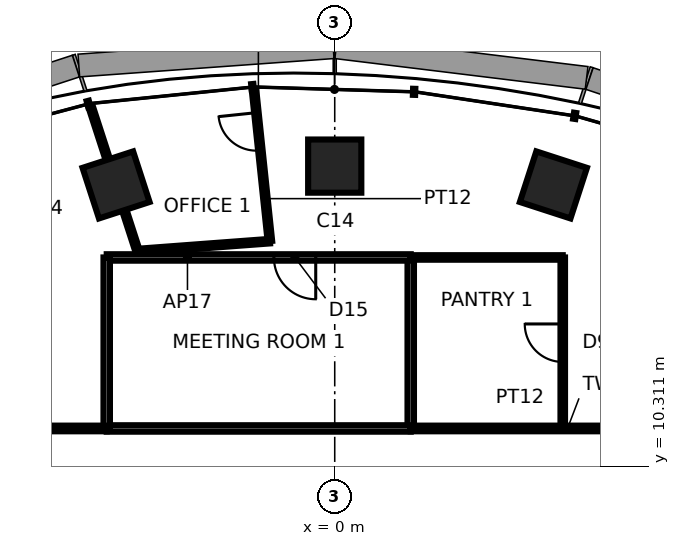
"""IFC4 building model, lengths in metres.
Left out: names, types, materials, properties, quantities, classifications, styles, units other than length and angle.
Written with IfcOpenShell. Run it as: python <this file> out.ifc"""

import sys

from ifc_helpers import new_model, si_unit, direction, frame, frame_2d, origin, origin_2d, place, context, subcontext, project, spatial, rectangle, extrude, element, fill, save


model = new_model("IFC4")
c1 = context("Model", 3, precision=1e-05, world=origin(), true_north=direction((0.0, 1.0)))
c2 = subcontext(c1, "Body", "Model", "MODEL_VIEW")
j1 = project(units=[si_unit("LENGTHUNIT", "METRE"), si_unit("PLANEANGLEUNIT", "RADIAN")], contexts=[c1])
p1 = place(None, origin())
s1 = spatial("IfcSite", under=j1, at=p1, CompositionType="ELEMENT")
p2 = place(p1, origin())
s2 = spatial("IfcBuilding", under=s1, at=p2, CompositionType="ELEMENT")
p3 = place(p2, frame((0.0, 0.0, 226.7)))
s3 = spatial("IfcBuildingStorey", under=s2, at=p3, CompositionType="ELEMENT", Elevation=226.7)
for number, where, z_axis, x_axis in (
    (1, (5.754, 17.708, 0.0), (0.0, 0.0, 1.0), (0.309, 0.951, 0.0)),
    (2, (0.0, 18.204, 0.0), (0.0, 0.0, 1.0), (0.0, 1.0, 0.0)),
    (3, (-5.754, 17.708, 0.0), (0.0, 0.0, 1.0), (-0.309, 0.951, 0.0)),
):
    element("IfcColumn", number, at=place(p3, frame(where, z_axis=z_axis, x_axis=x_axis)), inside=s3, PredefinedType="COLUMN", context=c2, shape_type="SweptSolid", body=[
        extrude(rectangle(XDim=1.4, YDim=1.4, at=origin_2d()), origin(), (0.0, 0.0, 1.0), 3.9),
    ])
p4 = place(p3, frame((16.0, 11.3, 0.0), z_axis=(0.0, 0.0, 1.0), x_axis=(-1.0, 0.0, 0.0)))
e4 = element("IfcWall", 4, at=p4, inside=s3, PredefinedType="PARTITIONING", context=c2, shape_type="SweptSolid", body=[
    extrude(rectangle(XDim=14.0, YDim=0.15, at=frame_2d((7.0, 0.0))), origin(), (0.0, 0.0, 1.0), 3.74),
])
p5 = place(p4, frame((4.4, 0.0, 0.0)))
e5 = element("IfcOpeningElement", 5, at=p5, cuts=e4, PredefinedType="OPENING", context=c2, shape_type="SweptSolid", body=[
    extrude(rectangle(XDim=1.2, YDim=2.4, at=frame_2d((0.6, 1.2))), frame((0.0, 0.085, 0.0), z_axis=(0.0, -1.0, 0.0), x_axis=(1.0, 0.0, 0.0)), (0.0, 0.0, 1.0), 0.17),
])
p6 = place(p3, frame((6.0, 11.3, 0.0), z_axis=(0.0, 0.0, 1.0), x_axis=(0.0, 1.0, 0.0)))
e6 = element("IfcWall", 6, at=p6, inside=s3, PredefinedType="PARTITIONING", context=c2, shape_type="SweptSolid", body=[
    extrude(rectangle(XDim=4.5, YDim=0.12, at=frame_2d((2.25, 0.0))), origin(), (0.0, 0.0, 1.0), 3.74),
])
p7 = place(p6, frame((1.75, 0.0, 0.0)))
e7 = element("IfcOpeningElement", 7, at=p7, cuts=e6, PredefinedType="OPENING", context=c2, shape_type="SweptSolid", body=[
    extrude(rectangle(XDim=1.0, YDim=2.4, at=frame_2d((0.5, 1.2))), frame((0.0, 0.07, 0.0), z_axis=(0.0, -1.0, 0.0), x_axis=(1.0, 0.0, 0.0)), (0.0, 0.0, 1.0), 0.14),
])
p8 = place(p3, frame((6.0, 15.8, 0.0), z_axis=(0.0, 0.0, 1.0), x_axis=(-1.0, 0.0, 0.0)))
e8 = element("IfcWall", 8, at=p8, inside=s3, PredefinedType="PARTITIONING", context=c2, shape_type="SweptSolid", body=[
    extrude(rectangle(XDim=4.0, YDim=0.12, at=frame_2d((2.0, 0.0))), origin(), (0.0, 0.0, 1.0), 3.74),
])
p9 = place(p3, frame((2.0, 15.8, 0.0), z_axis=(0.0, 0.0, 1.0), x_axis=(0.0, -1.0, 0.0)))
e9 = element("IfcWall", 9, at=p9, inside=s3, PredefinedType="PARTITIONING", context=c2, shape_type="SweptSolid", body=[
    extrude(rectangle(XDim=4.5, YDim=0.17, at=frame_2d((2.25, 0.0))), origin(), (0.0, 0.0, 1.0), 3.74),
])
p10 = place(p3, frame((-1.706, 16.229, 0.0), z_axis=(0.0, 0.0, 1.0), x_axis=(-0.104494148666, 0.99452550138, 0.0)))
e10 = element("IfcWall", 10, at=p10, inside=s3, PredefinedType="PARTITIONING", context=c2, shape_type="SweptSolid", body=[
    extrude(rectangle(XDim=4.0, YDim=0.12, at=frame_2d((2.0, 0.0))), origin(), (0.0, 0.0, 1.0), 3.74),
])
p11 = place(p10, frame((2.4, 0.0, 0.0)))
e11 = element("IfcOpeningElement", 11, at=p11, cuts=e10, PredefinedType="OPENING", context=c2, shape_type="SweptSolid", body=[
    extrude(rectangle(XDim=1.0, YDim=2.4, at=frame_2d((0.5, 1.2))), frame((0.0, 0.07, 0.0), z_axis=(0.0, -1.0, 0.0), x_axis=(1.0, 0.0, 0.0)), (0.0, 0.0, 1.0), 0.14),
])
p12 = place(p3, frame((2.0, 15.8, 0.0), z_axis=(0.0, 0.0, 1.0), x_axis=(-1.0, 0.0, 0.0)))
e12 = element("IfcWall", 12, at=p12, inside=s3, PredefinedType="PARTITIONING", context=c2, shape_type="SweptSolid", body=[
    extrude(rectangle(XDim=8.0, YDim=0.17, at=frame_2d((4.0, 0.0))), origin(), (0.0, 0.0, 1.0), 3.74),
])
p13 = place(p12, frame((2.5, 0.0, 0.0)))
e13 = element("IfcOpeningElement", 13, at=p13, cuts=e12, PredefinedType="OPENING", context=c2, shape_type="SweptSolid", body=[
    extrude(rectangle(XDim=1.1, YDim=2.4, at=frame_2d((0.55, 1.2))), frame((0.0, 0.095, 0.0), z_axis=(0.0, -1.0, 0.0), x_axis=(1.0, 0.0, 0.0)), (0.0, 0.0, 1.0), 0.19),
])
p14 = place(p3, frame((-6.0, 11.3, 0.0), z_axis=(0.0, 0.0, 1.0), x_axis=(1.0, 0.0, 0.0)))
e14 = element("IfcWall", 14, at=p14, inside=s3, PredefinedType="PARTITIONING", context=c2, shape_type="SweptSolid", body=[
    extrude(rectangle(XDim=8.0, YDim=0.17, at=frame_2d((4.0, 0.0))), origin(), (0.0, 0.0, 1.0), 3.74),
])
p15 = place(p3, frame((-5.188, 15.969, 0.0), z_axis=(0.0, 0.0, 1.0), x_axis=(0.997219476507, 0.074520572167, 0.0)))
e15 = element("IfcWall", 15, at=p15, inside=s3, PredefinedType="PARTITIONING", context=c2, shape_type="SweptSolid", body=[
    extrude(rectangle(XDim=3.492, YDim=0.12, at=frame_2d((1.746, 0.0))), origin(), (0.0, 0.0, 1.0), 3.74),
])
p16 = place(p3, frame((-6.425, 19.773, 0.0), z_axis=(0.0, 0.0, 1.0), x_axis=(0.309022586479, -0.951054699292, 0.0)))
e16 = element("IfcWall", 16, at=p16, inside=s3, PredefinedType="PARTITIONING", context=c2, shape_type="SweptSolid", body=[
    extrude(rectangle(XDim=4.0, YDim=0.12, at=frame_2d((2.0, 0.0))), origin(), (0.0, 0.0, 1.0), 3.04),
])
p17 = place(p3, frame((-6.0, 15.8, 0.0), z_axis=(0.0, 0.0, 1.0), x_axis=(0.0, -1.0, 0.0)))
e17 = element("IfcWall", 17, at=p17, inside=s3, PredefinedType="PARTITIONING", context=c2, shape_type="SweptSolid", body=[
    extrude(rectangle(XDim=4.5, YDim=0.17, at=frame_2d((2.25, 0.0))), origin(), (0.0, 0.0, 1.0), 3.74),
])
p18 = place(p3, frame((-6.0, 11.3, 0.0), z_axis=(0.0, 0.0, 1.0), x_axis=(-1.0, 0.0, 0.0)))
e18 = element("IfcWall", 18, at=p18, inside=s3, PredefinedType="PARTITIONING", context=c2, shape_type="SweptSolid", body=[
    extrude(rectangle(XDim=10.0, YDim=0.15, at=frame_2d((5.0, 0.0))), origin(), (0.0, 0.0, 1.0), 3.74),
])
p19 = place(p11, origin())
e19 = element("IfcDoor", 19, at=p19, inside=s3, OperationType="SINGLE_SWING_RIGHT", PredefinedType="DOOR", context=c2, shape_type="SweptSolid", body=[
    extrude(rectangle(XDim=1.0, YDim=2.4, at=frame_2d((0.5, 1.2))), frame((0.0, 0.025, 0.0), z_axis=(0.0, -1.0, 0.0), x_axis=(1.0, 0.0, 0.0)), (0.0, 0.0, 1.0), 0.05),
])
fill(e11, e19)
p20 = place(p13, origin())
e20 = element("IfcDoor", 20, at=p20, inside=s3, OperationType="SINGLE_SWING_LEFT", PredefinedType="DOOR", context=c2, shape_type="SweptSolid", body=[
    extrude(rectangle(XDim=1.1, YDim=2.4, at=frame_2d((0.55, 1.2))), frame((0.0, 0.025, 0.0), z_axis=(0.0, -1.0, 0.0), x_axis=(1.0, 0.0, 0.0)), (0.0, 0.0, 1.0), 0.05),
])
fill(e13, e20)
p21 = place(p7, origin())
e21 = element("IfcDoor", 21, at=p21, inside=s3, OperationType="SINGLE_SWING_RIGHT", PredefinedType="DOOR", context=c2, shape_type="SweptSolid", body=[
    extrude(rectangle(XDim=1.0, YDim=2.4, at=frame_2d((0.5, 1.2))), frame((0.0, 0.025, 0.0), z_axis=(0.0, -1.0, 0.0), x_axis=(1.0, 0.0, 0.0)), (0.0, 0.0, 1.0), 0.05),
])
fill(e7, e21)
save(model, sys.argv[1])
